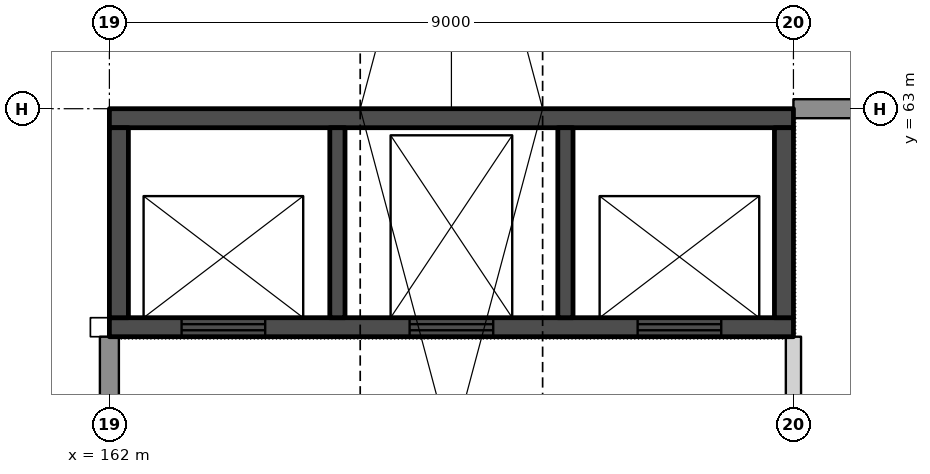
"""IFC4 building model, lengths in metres.
Left out: names, types, materials, properties, quantities, classifications, styles, units other than length and angle.
Written with IfcOpenShell. Run it as: python <this file> out.ifc"""

import sys

from ifc_helpers import new_model, si_unit, direction, frame, frame_2d, origin, place, context, subcontext, project, spatial, polyline, rectangle, outline, extrude, element, fill, save


model = new_model("IFC4")
c1 = context("Model", 3, precision=1e-05, world=origin(), true_north=direction((0.0, 1.0)))
c2 = subcontext(c1, "Body", "Model", "MODEL_VIEW")
j1 = project(units=[si_unit("LENGTHUNIT", "METRE"), si_unit("PLANEANGLEUNIT", "RADIAN")], contexts=[c1])
p1 = place(None, origin())
s1 = spatial("IfcSite", under=j1, at=p1, CompositionType="ELEMENT")
p2 = place(p1, origin())
s2 = spatial("IfcBuilding", under=s1, at=p2, CompositionType="ELEMENT")
p3 = place(p2, frame((0.0, 0.0, 33.5)))
s3 = spatial("IfcBuildingStorey", under=s2, at=p3, CompositionType="ELEMENT", Elevation=33.5)
p4 = place(p3, frame((171.0, 54.35, 0.0), z_axis=(0.0, 0.0, 1.0), x_axis=(0.0, 1.0, 0.0)))
e1 = element("IfcWall", 1, at=p4, inside=s3, PredefinedType="PARTITIONING", context=c2, shape_type="SweptSolid", body=[
    extrude(rectangle(XDim=5.65, YDim=0.2, at=frame_2d((2.825, 0.0))), origin(), (0.0, 0.0, 1.0), 4.0),
])
p5 = place(p3, frame((162.0, 60.125, 0.0), z_axis=(0.0, 0.0, 1.0), x_axis=(1.0, 0.0, 0.0)))
e2 = element("IfcWall", 2, at=p5, inside=s3, PredefinedType="SHEAR", context=c2, shape_type="SweptSolid", body=[
    extrude(rectangle(XDim=9.0, YDim=0.25, at=frame_2d((4.5, 0.0))), origin(), (0.0, 0.0, 1.0), 4.0),
])
p6 = place(p5, frame((0.95, 0.0, 0.0)))
e3 = element("IfcOpeningElement", 3, at=p6, cuts=e2, PredefinedType="OPENING", context=c2, shape_type="SweptSolid", body=[
    extrude(rectangle(XDim=1.1, YDim=2.1, at=frame_2d((0.55, 1.05))), frame((0.0, 0.135, 0.0), z_axis=(0.0, -1.0, 0.0), x_axis=(1.0, 0.0, 0.0)), (0.0, 0.0, 1.0), 0.27),
])
p7 = place(p5, frame((3.95, 0.0, 0.0)))
e4 = element("IfcOpeningElement", 4, at=p7, cuts=e2, PredefinedType="OPENING", context=c2, shape_type="SweptSolid", body=[
    extrude(rectangle(XDim=1.1, YDim=2.1, at=frame_2d((0.55, 1.05))), frame((0.0, 0.135, 0.0), z_axis=(0.0, -1.0, 0.0), x_axis=(1.0, 0.0, 0.0)), (0.0, 0.0, 1.0), 0.27),
])
p8 = place(p5, frame((6.95, 0.0, 0.0)))
e5 = element("IfcOpeningElement", 5, at=p8, cuts=e2, PredefinedType="OPENING", context=c2, shape_type="SweptSolid", body=[
    extrude(rectangle(XDim=1.1, YDim=2.1, at=frame_2d((0.55, 1.05))), frame((0.0, 0.135, 0.0), z_axis=(0.0, -1.0, 0.0), x_axis=(1.0, 0.0, 0.0)), (0.0, 0.0, 1.0), 0.27),
])
p9 = place(p3, frame((162.0, 62.875, 0.0), z_axis=(0.0, 0.0, 1.0), x_axis=(1.0, 0.0, 0.0)))
e6 = element("IfcWall", 6, at=p9, inside=s3, PredefinedType="SHEAR", context=c2, shape_type="SweptSolid", body=[
    extrude(rectangle(XDim=9.0, YDim=0.25, at=frame_2d((4.5, 0.0))), origin(), (0.0, 0.0, 1.0), 4.0),
])
for number, where, z_axis, x_axis in (
    (7, (162.125, 60.25, 0.0), (0.0, 0.0, 1.0), (0.0, 1.0, 0.0)),
    (8, (170.875, 60.25, 0.0), (0.0, 0.0, 1.0), (0.0, 1.0, 0.0)),
):
    element("IfcWall", number, at=place(p3, frame(where, z_axis=z_axis, x_axis=x_axis)), inside=s3, PredefinedType="SHEAR", context=c2, shape_type="SweptSolid", body=[
        extrude(rectangle(XDim=2.5, YDim=0.25, at=frame_2d((1.25, 0.0))), origin(), (0.0, 0.0, 1.0), 4.0),
    ])
for number, where, z_axis, x_axis in (
    (9, (165.0, 60.25, 0.0), (0.0, 0.0, 1.0), (0.0, 1.0, 0.0)),
    (10, (168.0, 60.25, 0.0), (0.0, 0.0, 1.0), (0.0, 1.0, 0.0)),
):
    element("IfcWall", number, at=place(p3, frame(where, z_axis=z_axis, x_axis=x_axis)), inside=s3, PredefinedType="SHEAR", context=c2, shape_type="SweptSolid", body=[
        extrude(rectangle(XDim=2.5, YDim=0.2, at=frame_2d((1.25, 0.0))), origin(), (0.0, 0.0, 1.0), 4.0),
    ])
p10 = place(p3, frame((162.0, 54.35, 0.0), z_axis=(0.0, 0.0, 1.0), x_axis=(0.0, 1.0, 0.0)))
e11 = element("IfcWall", 11, at=p10, inside=s3, PredefinedType="SOLIDWALL", context=c2, shape_type="SweptSolid", body=[
    extrude(rectangle(XDim=5.65, YDim=0.25, at=frame_2d((2.825, 0.0))), origin(), (0.0, 0.0, 1.0), 4.0),
])
p11 = place(p3, frame((171.0, 63.0, 0.0), z_axis=(0.0, 0.0, 1.0), x_axis=(1.0, 0.0, 0.0)))
e12 = element("IfcWall", 12, at=p11, inside=s3, PredefinedType="SOLIDWALL", context=c2, shape_type="SweptSolid", body=[
    extrude(rectangle(XDim=9.0, YDim=0.25, at=frame_2d((4.5, 0.0))), origin(), (0.0, 0.0, 1.0), 4.0),
])
p12 = place(p6, origin())
e13 = element("IfcDoor", 13, at=p12, inside=s3, OperationType="DOUBLE_DOOR_SLIDING", PredefinedType="DOOR", context=c2, shape_type="SweptSolid", body=[
    extrude(rectangle(XDim=1.1, YDim=2.1, at=frame_2d((0.55, 1.05))), frame((0.0, 0.025, 0.0), z_axis=(0.0, -1.0, 0.0), x_axis=(1.0, 0.0, 0.0)), (0.0, 0.0, 1.0), 0.05),
])
fill(e3, e13)
p13 = place(p7, origin())
e14 = element("IfcDoor", 14, at=p13, inside=s3, OperationType="DOUBLE_DOOR_SLIDING", PredefinedType="DOOR", context=c2, shape_type="SweptSolid", body=[
    extrude(rectangle(XDim=1.1, YDim=2.1, at=frame_2d((0.55, 1.05))), frame((0.0, 0.025, 0.0), z_axis=(0.0, -1.0, 0.0), x_axis=(1.0, 0.0, 0.0)), (0.0, 0.0, 1.0), 0.05),
])
fill(e4, e14)
p14 = place(p8, origin())
e15 = element("IfcDoor", 15, at=p14, inside=s3, OperationType="DOUBLE_DOOR_SLIDING", PredefinedType="DOOR", context=c2, shape_type="SweptSolid", body=[
    extrude(rectangle(XDim=1.1, YDim=2.1, at=frame_2d((0.55, 1.05))), frame((0.0, 0.025, 0.0), z_axis=(0.0, -1.0, 0.0), x_axis=(1.0, 0.0, 0.0)), (0.0, 0.0, 1.0), 0.05),
])
fill(e5, e15)
p15 = place(p2, frame((0.0, 0.0, 47.1)))
p16 = place(p15, frame((135.045, 26.425, 9.109), z_axis=(0.0, -0.072032280133, 0.99740230129), x_axis=(1.0, 0.0, 0.0)))
p17 = place(p16, origin())
e16 = element("IfcWindow", 16, at=p17, inside=s3, PartitioningType="SINGLE_PANEL", PredefinedType="SKYLIGHT", context=c2, shape_type="SweptSolid", body=[
    extrude(outline(polyline([(30.255, 27.647), (32.655, 27.647), (32.655, 36.67), (30.255, 36.67), (30.255, 27.647)])), origin(), (0.0, 0.0, -1.0), 0.05),
])
p18 = place(p16, origin())
e17 = element("IfcWindow", 17, at=p18, inside=s3, PartitioningType="SINGLE_PANEL", PredefinedType="SKYLIGHT", context=c2, shape_type="SweptSolid", body=[
    extrude(outline(polyline([(30.255, 36.67), (32.655, 36.67), (32.655, 45.694), (30.255, 45.694), (30.255, 36.67)])), origin(), (0.0, 0.0, -1.0), 0.05),
])
save(model, sys.argv[1])
